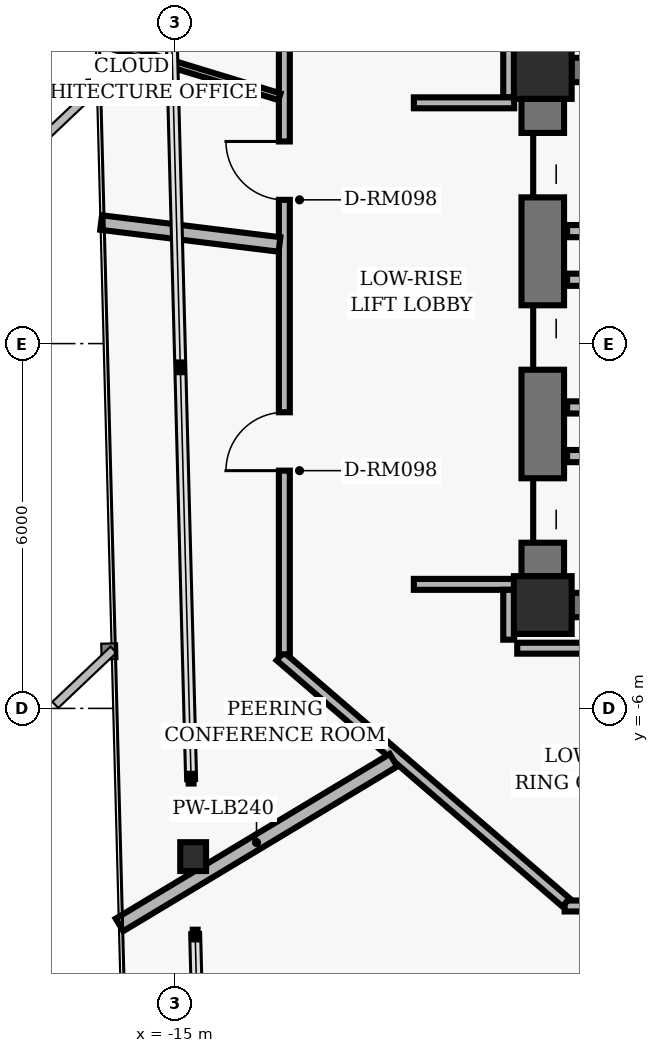
"""IFC4 building model, lengths in metres.
Left out: names, types, materials, properties, quantities, classifications, styles, units other than length and angle.
Written with IfcOpenShell. Run it as: python <this file> out.ifc"""

import sys

from ifc_helpers import new_model, si_unit, direction, frame, frame_2d, origin, origin_2d, place, context, subcontext, project, spatial, rectangle, hollow_rectangle, i_section, extrude, element, fill, save


model = new_model("IFC4")
c1 = context("Model", 3, precision=1e-05, world=origin(), true_north=direction((0.0, 1.0)))
c2 = subcontext(c1, "Body", "Model", "MODEL_VIEW")
j1 = project(units=[si_unit("LENGTHUNIT", "METRE"), si_unit("PLANEANGLEUNIT", "RADIAN")], contexts=[c1])
p1 = place(None, origin())
s1 = spatial("IfcSite", under=j1, at=p1, CompositionType="ELEMENT")
p2 = place(p1, origin())
s2 = spatial("IfcBuilding", under=s1, at=p2, CompositionType="ELEMENT")
p3 = place(p2, frame((0.0, 0.0, 35.68)))
s3 = spatial("IfcBuildingStorey", under=s2, at=p3, CompositionType="ELEMENT", Elevation=35.68)
for number, where, z_axis, x_axis in (
    (1, (-8.95, 4.5, 0.0), (0.0, 0.0, 1.0), (1.0, 0.0, 0.0)),
    (2, (-8.95, -4.3, 0.0), (0.0, 0.0, 1.0), (1.0, 0.0, 0.0)),
):
    element("IfcColumn", number, at=place(p3, frame(where, z_axis=z_axis, x_axis=x_axis)), inside=s3, PredefinedType="COLUMN", context=c2, shape_type="SweptSolid", body=[
        extrude(hollow_rectangle(XDim=0.95, YDim=0.95, WallThickness=0.06, InnerFilletRadius=0.02, OuterFilletRadius=0.04, at=origin_2d()), origin(), (0.0, 0.0, 1.0), 3.36),
    ])
p4 = place(p3, frame((-8.95, -3.825, 0.0), z_axis=(0.0, 0.0, 1.0), x_axis=(0.0, 1.0, 0.0)))
e3 = element("IfcWall", 3, at=p4, inside=s3, PredefinedType="SHEAR", context=c2, shape_type="SweptSolid", body=[
    extrude(rectangle(XDim=7.85, YDim=0.7, at=frame_2d((3.925, 0.0))), origin(), (0.0, 0.0, 1.0), 3.098),
])
p5 = place(p4, frame((0.55, 0.0, 0.0)))
e4 = element("IfcOpeningElement", 4, at=p5, cuts=e3, PredefinedType="OPENING", context=c2, shape_type="SweptSolid", body=[
    extrude(rectangle(XDim=1.06, YDim=2.04, at=frame_2d((0.53, 1.02))), frame((0.0, 0.36, 0.0), z_axis=(0.0, -1.0, 0.0), x_axis=(1.0, 0.0, 0.0)), (0.0, 0.0, 1.0), 0.72),
])
p6 = place(p4, frame((3.395, 0.0, 0.0)))
e5 = element("IfcOpeningElement", 5, at=p6, cuts=e3, PredefinedType="OPENING", context=c2, shape_type="SweptSolid", body=[
    extrude(rectangle(XDim=1.06, YDim=2.04, at=frame_2d((0.53, 1.02))), frame((0.0, 0.36, 0.0), z_axis=(0.0, -1.0, 0.0), x_axis=(1.0, 0.0, 0.0)), (0.0, 0.0, 1.0), 0.72),
])
p7 = place(p4, frame((6.23, 0.0, 0.0)))
e6 = element("IfcOpeningElement", 6, at=p7, cuts=e3, PredefinedType="OPENING", context=c2, shape_type="SweptSolid", body=[
    extrude(rectangle(XDim=1.06, YDim=2.04, at=frame_2d((0.53, 1.02))), frame((0.0, 0.36, 0.0), z_axis=(0.0, -1.0, 0.0), x_axis=(1.0, 0.0, 0.0)), (0.0, 0.0, 1.0), 0.72),
])
for number, where, z_axis, x_axis in (
    (7, (-8.475, 4.5, 0.0), (0.0, 0.0, 1.0), (1.0, 0.0, 0.0)),
    (8, (-8.475, -4.3, 0.0), (0.0, 0.0, 1.0), (1.0, 0.0, 0.0)),
):
    element("IfcWall", number, at=place(p3, frame(where, z_axis=z_axis, x_axis=x_axis)), inside=s3, PredefinedType="SHEAR", context=c2, shape_type="SweptSolid", body=[
        extrude(rectangle(XDim=1.95, YDim=0.4, at=frame_2d((0.975, 0.0))), origin(), (0.0, 0.0, 1.0), 3.098),
    ])
p8 = place(p3, frame((-14.7, -8.438, 0.0), z_axis=(0.0, 0.0, 1.0), x_axis=(1.0, 0.0, 0.0)))
e9 = element("IfcColumn", 9, at=p8, inside=s3, PredefinedType="COLUMN", context=c2, shape_type="SweptSolid", body=[
    extrude(i_section(OverallWidth=0.424, OverallDepth=0.474, WebThickness=0.048, FlangeThickness=0.077, FilletRadius=0.025, at=origin_2d()), origin(), (0.0, 0.0, 1.0), 3.36),
])
for number, where, z_axis, x_axis in (
    (10, (-8.55, -1.85, 0.0), (0.0, 0.0, 1.0), (1.0, 0.0, 0.0)),
    (11, (-8.55, 1.85, 0.0), (0.0, 0.0, 1.0), (1.0, 0.0, 0.0)),
):
    element("IfcWall", number, at=place(p3, frame(where, z_axis=z_axis, x_axis=x_axis)), inside=s3, PredefinedType="PARTITIONING", context=c2, shape_type="SweptSolid", body=[
        extrude(rectangle(XDim=2.1, YDim=0.2, at=frame_2d((1.05, 0.0))), origin(), (0.0, 0.0, 1.0), 3.073),
    ])
for number, where, z_axis, x_axis in (
    (12, (-8.55, -1.05, 0.0), (0.0, 0.0, 1.0), (1.0, 0.0, 0.0)),
    (13, (-8.55, 1.05, 0.0), (0.0, 0.0, 1.0), (1.0, 0.0, 0.0)),
):
    element("IfcWall", number, at=place(p3, frame(where, z_axis=z_axis, x_axis=x_axis)), inside=s3, PredefinedType="PARTITIONING", context=c2, shape_type="SweptSolid", body=[
        extrude(rectangle(XDim=1.91, YDim=0.2, at=frame_2d((0.955, 0.0))), origin(), (0.0, 0.0, 1.0), 3.073),
    ])
p9 = place(p3, frame((8.41, -9.25, 0.0), z_axis=(0.0, 0.0, 1.0), x_axis=(-1.0, 0.0, 0.0)))
e14 = element("IfcWall", 14, at=p9, inside=s3, PredefinedType="PARTITIONING", context=c2, shape_type="SweptSolid", body=[
    extrude(rectangle(XDim=17.0, YDim=0.18, at=frame_2d((8.5, 0.0))), origin(), (0.0, 0.0, 1.0), 2.587),
])
p10 = place(p9, frame((13.703, 0.0, 0.0)))
e15 = element("IfcOpeningElement", 15, at=p10, cuts=e14, PredefinedType="OPENING", context=c2, shape_type="SweptSolid", body=[
    extrude(rectangle(XDim=0.96, YDim=2.02, at=frame_2d((0.48, 1.01))), frame((0.0, 0.1, 0.0), z_axis=(0.0, -1.0, 0.0), x_axis=(1.0, 0.0, 0.0)), (0.0, 0.0, 1.0), 0.2),
])
p11 = place(p9, frame((7.745, 0.0, 0.0)))
e16 = element("IfcOpeningElement", 16, at=p11, cuts=e14, PredefinedType="OPENING", context=c2, shape_type="SweptSolid", body=[
    extrude(rectangle(XDim=0.96, YDim=2.02, at=frame_2d((0.48, 1.01))), frame((0.0, 0.1, 0.0), z_axis=(0.0, -1.0, 0.0), x_axis=(1.0, 0.0, 0.0)), (0.0, 0.0, 1.0), 0.2),
])
p12 = place(p3, frame((-8.568, -9.191, 0.0), z_axis=(0.0, 0.0, 1.0), x_axis=(-0.757556899173, 0.652769135694, 0.0)))
e17 = element("IfcWall", 17, at=p12, inside=s3, PredefinedType="PARTITIONING", context=c2, shape_type="SweptSolid", body=[
    extrude(rectangle(XDim=6.204, YDim=0.18, at=frame_2d((3.102, 0.0))), origin(), (0.0, 0.0, 1.0), 3.073),
])
p13 = place(p3, frame((-13.2, -5.11, 0.0), z_axis=(0.0, 0.0, 1.0), x_axis=(0.0, 1.0, 0.0)))
e18 = element("IfcWall", 18, at=p13, inside=s3, PredefinedType="PARTITIONING", context=c2, shape_type="SweptSolid", body=[
    extrude(rectangle(XDim=10.22, YDim=0.18, at=frame_2d((5.11, 0.0))), origin(), (0.0, 0.0, 1.0), 2.587),
])
p14 = place(p13, frame((3.02, 0.0, 0.0)))
e19 = element("IfcOpeningElement", 19, at=p14, cuts=e18, PredefinedType="OPENING", context=c2, shape_type="SweptSolid", body=[
    extrude(rectangle(XDim=0.96, YDim=2.02, at=frame_2d((0.48, 1.01))), frame((0.0, 0.1, 0.0), z_axis=(0.0, -1.0, 0.0), x_axis=(1.0, 0.0, 0.0)), (0.0, 0.0, 1.0), 0.2),
])
p15 = place(p13, frame((7.474, 0.0, 0.0)))
e20 = element("IfcOpeningElement", 20, at=p15, cuts=e18, PredefinedType="OPENING", context=c2, shape_type="SweptSolid", body=[
    extrude(rectangle(XDim=0.96, YDim=2.02, at=frame_2d((0.48, 1.01))), frame((0.0, 0.1, 0.0), z_axis=(0.0, -1.0, 0.0), x_axis=(1.0, 0.0, 0.0)), (0.0, 0.0, 1.0), 0.2),
])
p16 = place(p3, frame((-9.51, 4.87, 0.0), z_axis=(0.0, 0.0, 1.0), x_axis=(0.0, -1.0, 0.0)))
e21 = element("IfcWall", 21, at=p16, inside=s3, PredefinedType="PARTITIONING", context=c2, shape_type="SweptSolid", body=[
    extrude(rectangle(XDim=0.82, YDim=0.18, at=frame_2d((0.41, 0.0))), origin(), (0.0, 0.0, 1.0), 3.073),
])
for number, where, z_axis, x_axis in (
    (22, (-9.42, 3.96, 0.0), (0.0, 0.0, 1.0), (-1.0, 0.0, 0.0)),
    (23, (-11.07, -3.96, 0.0), (0.0, 0.0, 1.0), (1.0, 0.0, 0.0)),
):
    element("IfcWall", number, at=place(p3, frame(where, z_axis=z_axis, x_axis=x_axis)), inside=s3, PredefinedType="PARTITIONING", context=c2, shape_type="SweptSolid", body=[
        extrude(rectangle(XDim=1.65, YDim=0.18, at=frame_2d((0.825, 0.0))), origin(), (0.0, 0.0, 1.0), 3.073),
    ])
p17 = place(p3, frame((-9.51, -4.05, 0.0), z_axis=(0.0, 0.0, 1.0), x_axis=(0.0, -1.0, 0.0)))
e24 = element("IfcWall", 24, at=p17, inside=s3, PredefinedType="PARTITIONING", context=c2, shape_type="SweptSolid", body=[
    extrude(rectangle(XDim=0.82, YDim=0.18, at=frame_2d((0.41, 0.0))), origin(), (0.0, 0.0, 1.0), 2.358),
])
p18 = place(p3, frame((-9.37, -5.01, 0.0), z_axis=(0.0, 0.0, 1.0), x_axis=(1.0, 0.0, 0.0)))
e25 = element("IfcWall", 25, at=p18, inside=s3, PredefinedType="PARTITIONING", context=c2, shape_type="SweptSolid", body=[
    extrude(rectangle(XDim=3.34, YDim=0.18, at=frame_2d((1.67, 0.0))), origin(), (0.0, 0.0, 1.0), 3.073),
])
p19 = place(p3, frame((-11.405, -6.853, 0.0), z_axis=(0.0, 0.0, 1.0), x_axis=(-0.857148529273, -0.515069314524, 0.0)))
e26 = element("IfcWall", 26, at=p19, inside=s3, PredefinedType="PARTITIONING", context=c2, shape_type="SweptSolid", body=[
    extrude(rectangle(XDim=5.257, YDim=0.24, at=frame_2d((2.628, 0.0))), origin(), (0.0, 0.0, 1.0), 2.358),
])
p20 = place(p3, frame((-13.28, 4.06, 0.0), z_axis=(0.0, 0.0, 1.0), x_axis=(-0.956293781209, 0.292407599118, 0.0)))
e27 = element("IfcWall", 27, at=p20, inside=s3, PredefinedType="MOVABLE", context=c2, shape_type="SweptSolid", body=[
    extrude(rectangle(XDim=3.149, YDim=0.115, at=frame_2d((1.575, 0.0))), origin(), (0.0, 0.0, 1.0), 3.073),
])
p21 = place(p3, frame((-13.28, 1.631, 0.0), z_axis=(0.0, 0.0, 1.0), x_axis=(-0.992548714485, 0.121848468903, 0.0)))
e28 = element("IfcWall", 28, at=p21, inside=s3, PredefinedType="PARTITIONING", context=c2, shape_type="SweptSolid", body=[
    extrude(rectangle(XDim=2.955, YDim=0.24, at=frame_2d((1.478, 0.0))), origin(), (0.0, 0.0, 1.0), 3.073),
])
p22 = place(p5, origin())
e29 = element("IfcDoor", 29, at=p22, inside=s3, OperationType="SLIDING_TO_LEFT", PredefinedType="DOOR", context=c2, shape_type="SweptSolid", body=[
    extrude(rectangle(XDim=1.06, YDim=2.04, at=frame_2d((0.53, 1.02))), frame((0.0, 0.025, 0.0), z_axis=(0.0, -1.0, 0.0), x_axis=(1.0, 0.0, 0.0)), (0.0, 0.0, 1.0), 0.05),
])
fill(e4, e29)
p23 = place(p6, origin())
e30 = element("IfcDoor", 30, at=p23, inside=s3, OperationType="SLIDING_TO_RIGHT", PredefinedType="DOOR", context=c2, shape_type="SweptSolid", body=[
    extrude(rectangle(XDim=1.06, YDim=2.04, at=frame_2d((0.53, 1.02))), frame((0.0, 0.025, 0.0), z_axis=(0.0, -1.0, 0.0), x_axis=(1.0, 0.0, 0.0)), (0.0, 0.0, 1.0), 0.05),
])
fill(e5, e30)
p24 = place(p7, origin())
e31 = element("IfcDoor", 31, at=p24, inside=s3, OperationType="SLIDING_TO_LEFT", PredefinedType="DOOR", context=c2, shape_type="SweptSolid", body=[
    extrude(rectangle(XDim=1.06, YDim=2.04, at=frame_2d((0.53, 1.02))), frame((0.0, 0.025, 0.0), z_axis=(0.0, -1.0, 0.0), x_axis=(1.0, 0.0, 0.0)), (0.0, 0.0, 1.0), 0.05),
])
fill(e6, e31)
p25 = place(p14, origin())
e32 = element("IfcDoor", 32, at=p25, inside=s3, OperationType="SINGLE_SWING_LEFT", PredefinedType="DOOR", context=c2, shape_type="SweptSolid", body=[
    extrude(rectangle(XDim=0.96, YDim=2.02, at=frame_2d((0.48, 1.01))), frame((0.0, 0.025, 0.0), z_axis=(0.0, -1.0, 0.0), x_axis=(1.0, 0.0, 0.0)), (0.0, 0.0, 1.0), 0.05),
])
fill(e19, e32)
p26 = place(p15, origin())
e33 = element("IfcDoor", 33, at=p26, inside=s3, OperationType="SINGLE_SWING_RIGHT", PredefinedType="DOOR", context=c2, shape_type="SweptSolid", body=[
    extrude(rectangle(XDim=0.96, YDim=2.02, at=frame_2d((0.48, 1.01))), frame((0.0, 0.025, 0.0), z_axis=(0.0, -1.0, 0.0), x_axis=(1.0, 0.0, 0.0)), (0.0, 0.0, 1.0), 0.05),
])
fill(e20, e33)
save(model, sys.argv[1])
